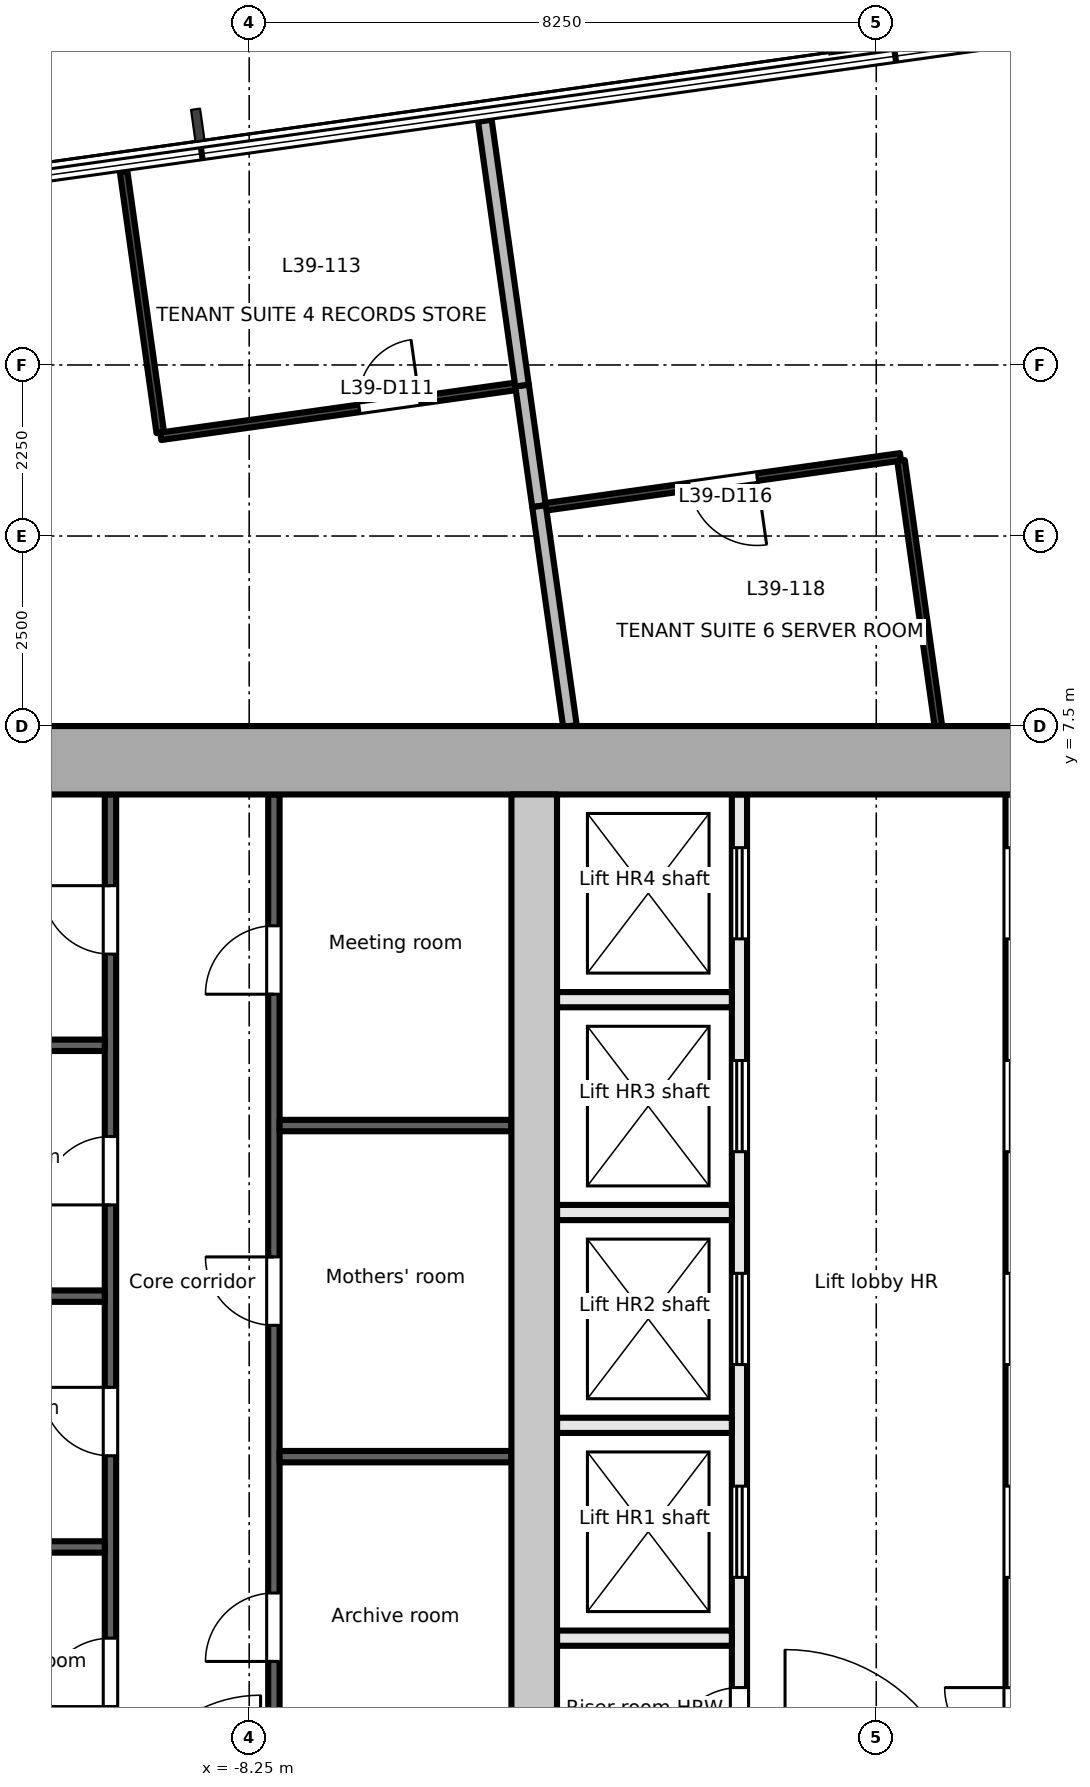
"""IFC4 building model, lengths in metres.
Left out: names, types, materials, properties, quantities, classifications, styles, units other than length and angle.
Written with IfcOpenShell. Run it as: python <this file> out.ifc"""

import sys

from ifc_helpers import new_model, si_unit, direction, frame, frame_2d, origin, origin_2d, place, context, subcontext, project, spatial, rectangle, extrude, element, fill, save


model = new_model("IFC4")
c1 = context("Model", 3, precision=1e-05, world=origin(), true_north=direction((0.0, 1.0)))
c2 = subcontext(c1, "Body", "Model", "MODEL_VIEW")
j1 = project(units=[si_unit("LENGTHUNIT", "METRE"), si_unit("PLANEANGLEUNIT", "RADIAN")], contexts=[c1])
p1 = place(None, origin())
s1 = spatial("IfcSite", under=j1, at=p1, CompositionType="ELEMENT")
p2 = place(p1, origin())
s2 = spatial("IfcBuilding", under=s1, at=p2, CompositionType="ELEMENT")
p3 = place(p2, frame((0.0, 0.0, 172.4)))
s3 = spatial("IfcBuildingStorey", under=s2, at=p3, CompositionType="ELEMENT", Elevation=172.4)
p4 = place(p3, frame((-0.125, 17.34, -0.2), z_axis=(0.0, 0.0, 1.0), x_axis=(0.99027049762, 0.139155817501, 0.0)))
e1 = element("IfcColumn", 1, at=p4, inside=s3, PredefinedType="COLUMN", context=c2, shape_type="SweptSolid", body=[
    extrude(rectangle(XDim=1.2, YDim=1.8, at=origin_2d()), origin(), (0.0, 0.0, 1.0), 3.9),
])
p5 = place(p3, frame((-18.0, 7.05, -0.2), z_axis=(0.0, 0.0, 1.0), x_axis=(1.0, 0.0, 0.0)))
e2 = element("IfcWall", 2, at=p5, inside=s3, PredefinedType="SHEAR", context=c2, shape_type="SweptSolid", body=[
    extrude(rectangle(XDim=36.0, YDim=0.9, at=frame_2d((18.0, 0.0))), origin(), (0.0, 0.0, 1.0), 3.9),
])
p6 = place(p3, frame((-4.5, -6.6, -0.2), z_axis=(0.0, 0.0, 1.0), x_axis=(0.0, 1.0, 0.0)))
e3 = element("IfcWall", 3, at=p6, inside=s3, PredefinedType="SHEAR", context=c2, shape_type="SweptSolid", body=[
    extrude(rectangle(XDim=13.2, YDim=0.6, at=frame_2d((6.6, 0.0))), origin(), (0.0, 0.0, 1.0), 3.9),
])
p7 = place(p3, frame((-10.075, -6.6, 0.0), z_axis=(0.0, 0.0, 1.0), x_axis=(0.0, 1.0, 0.0)))
e4 = element("IfcWall", 4, at=p7, inside=s3, PredefinedType="PARTITIONING", context=c2, shape_type="SweptSolid", body=[
    extrude(rectangle(XDim=13.2, YDim=0.15, at=frame_2d((6.6, 0.0))), origin(), (0.0, 0.0, 1.0), 3.7),
])
p8 = place(p7, frame((1.2, 0.0, 0.0)))
e5 = element("IfcOpeningElement", 5, at=p8, cuts=e4, PredefinedType="OPENING", context=c2, shape_type="SweptSolid", body=[
    extrude(rectangle(XDim=0.9, YDim=2.1, at=frame_2d((0.45, 1.05))), frame((0.0, 0.085, 0.0), z_axis=(0.0, -1.0, 0.0), x_axis=(1.0, 0.0, 0.0)), (0.0, 0.0, 1.0), 0.171),
])
p9 = place(p7, frame((4.5, 0.0, 0.0)))
e6 = element("IfcOpeningElement", 6, at=p9, cuts=e4, PredefinedType="OPENING", context=c2, shape_type="SweptSolid", body=[
    extrude(rectangle(XDim=0.9, YDim=2.1, at=frame_2d((0.45, 1.05))), frame((0.0, 0.085, 0.0), z_axis=(0.0, -1.0, 0.0), x_axis=(1.0, 0.0, 0.0)), (0.0, 0.0, 1.0), 0.171),
])
p10 = place(p7, frame((7.8, 0.0, 0.0)))
e7 = element("IfcOpeningElement", 7, at=p10, cuts=e4, PredefinedType="OPENING", context=c2, shape_type="SweptSolid", body=[
    extrude(rectangle(XDim=0.9, YDim=2.1, at=frame_2d((0.45, 1.05))), frame((0.0, 0.085, 0.0), z_axis=(0.0, -1.0, 0.0), x_axis=(1.0, 0.0, 0.0)), (0.0, 0.0, 1.0), 0.171),
])
p11 = place(p7, frame((11.1, 0.0, 0.0)))
e8 = element("IfcOpeningElement", 8, at=p11, cuts=e4, PredefinedType="OPENING", context=c2, shape_type="SweptSolid", body=[
    extrude(rectangle(XDim=0.9, YDim=2.1, at=frame_2d((0.45, 1.05))), frame((0.0, 0.085, 0.0), z_axis=(0.0, -1.0, 0.0), x_axis=(1.0, 0.0, 0.0)), (0.0, 0.0, 1.0), 0.171),
])
for number, where, z_axis, x_axis in (
    (9, (-13.2, -3.3, 0.0), (0.0, 0.0, 1.0), (1.0, 0.0, 0.0)),
    (10, (-13.2, 0.0, 0.0), (0.0, 0.0, 1.0), (1.0, 0.0, 0.0)),
    (11, (-13.2, 3.3, 0.0), (0.0, 0.0, 1.0), (1.0, 0.0, 0.0)),
):
    element("IfcWall", number, at=place(p3, frame(where, z_axis=z_axis, x_axis=x_axis)), inside=s3, PredefinedType="PARTITIONING", context=c2, shape_type="SweptSolid", body=[
        extrude(rectangle(XDim=3.05, YDim=0.15, at=frame_2d((1.525, 0.0))), origin(), (0.0, 0.0, 1.0), 3.7),
    ])
p12 = place(p3, frame((-7.925, -6.6, 0.0), z_axis=(0.0, 0.0, 1.0), x_axis=(0.0, 1.0, 0.0)))
e12 = element("IfcWall", 12, at=p12, inside=s3, PredefinedType="PARTITIONING", context=c2, shape_type="SweptSolid", body=[
    extrude(rectangle(XDim=13.2, YDim=0.15, at=frame_2d((6.6, 0.0))), origin(), (0.0, 0.0, 1.0), 3.7),
])
p13 = place(p12, frame((1.794, 0.0, 0.0)))
e13 = element("IfcOpeningElement", 13, at=p13, cuts=e12, PredefinedType="OPENING", context=c2, shape_type="SweptSolid", body=[
    extrude(rectangle(XDim=0.9, YDim=2.1, at=frame_2d((0.45, 1.05))), frame((0.0, 0.085, 0.0), z_axis=(0.0, -1.0, 0.0), x_axis=(1.0, 0.0, 0.0)), (0.0, 0.0, 1.0), 0.171),
])
p14 = place(p12, frame((6.216, 0.0, 0.0)))
e14 = element("IfcOpeningElement", 14, at=p14, cuts=e12, PredefinedType="OPENING", context=c2, shape_type="SweptSolid", body=[
    extrude(rectangle(XDim=0.9, YDim=2.1, at=frame_2d((0.45, 1.05))), frame((0.0, 0.085, 0.0), z_axis=(0.0, -1.0, 0.0), x_axis=(1.0, 0.0, 0.0)), (0.0, 0.0, 1.0), 0.171),
])
p15 = place(p12, frame((10.572, 0.0, 0.0)))
e15 = element("IfcOpeningElement", 15, at=p15, cuts=e12, PredefinedType="OPENING", context=c2, shape_type="SweptSolid", body=[
    extrude(rectangle(XDim=0.9, YDim=2.1, at=frame_2d((0.45, 1.05))), frame((0.0, 0.085, 0.0), z_axis=(0.0, -1.0, 0.0), x_axis=(1.0, 0.0, 0.0)), (0.0, 0.0, 1.0), 0.171),
])
for number, where, z_axis, x_axis in (
    (16, (-7.85, -2.112, 0.0), (0.0, 0.0, 1.0), (1.0, 0.0, 0.0)),
    (17, (-7.85, 2.244, 0.0), (0.0, 0.0, 1.0), (1.0, 0.0, 0.0)),
):
    element("IfcWall", number, at=place(p3, frame(where, z_axis=z_axis, x_axis=x_axis)), inside=s3, PredefinedType="PARTITIONING", context=c2, shape_type="SweptSolid", body=[
        extrude(rectangle(XDim=3.05, YDim=0.15, at=frame_2d((1.525, 0.0))), origin(), (0.0, 0.0, 1.0), 3.7),
    ])
p16 = place(p3, frame((-1.8, -6.6, 0.0), z_axis=(0.0, 0.0, 1.0), x_axis=(0.0, 1.0, 0.0)))
e18 = element("IfcWall", 18, at=p16, inside=s3, PredefinedType="PARTITIONING", context=c2, shape_type="SweptSolid", body=[
    extrude(rectangle(XDim=13.2, YDim=0.2, at=frame_2d((6.6, 0.0))), origin(), (0.0, 0.0, 1.0), 3.7),
])
p17 = place(p16, frame((0.55, 0.0, 0.0)))
e19 = element("IfcOpeningElement", 19, at=p17, cuts=e18, PredefinedType="OPENING", context=c2, shape_type="SweptSolid", body=[
    extrude(rectangle(XDim=0.9, YDim=2.1, at=frame_2d((0.45, 1.05))), frame((0.0, 0.111, 0.0), z_axis=(0.0, -1.0, 0.0), x_axis=(1.0, 0.0, 0.0)), (0.0, 0.0, 1.0), 0.221),
])
p18 = place(p16, frame((2.9, 0.0, 0.0)))
e20 = element("IfcOpeningElement", 20, at=p18, cuts=e18, PredefinedType="OPENING", context=c2, shape_type="SweptSolid", body=[
    extrude(rectangle(XDim=1.2, YDim=2.1, at=frame_2d((0.6, 1.05))), frame((0.0, 0.111, 0.0), z_axis=(0.0, -1.0, 0.0), x_axis=(1.0, 0.0, 0.0)), (0.0, 0.0, 1.0), 0.221),
])
p19 = place(p16, frame((5.7, 0.0, 0.0)))
e21 = element("IfcOpeningElement", 21, at=p19, cuts=e18, PredefinedType="OPENING", context=c2, shape_type="SweptSolid", body=[
    extrude(rectangle(XDim=1.2, YDim=2.1, at=frame_2d((0.6, 1.05))), frame((0.0, 0.111, 0.0), z_axis=(0.0, -1.0, 0.0), x_axis=(1.0, 0.0, 0.0)), (0.0, 0.0, 1.0), 0.221),
])
p20 = place(p16, frame((8.5, 0.0, 0.0)))
e22 = element("IfcOpeningElement", 22, at=p20, cuts=e18, PredefinedType="OPENING", context=c2, shape_type="SweptSolid", body=[
    extrude(rectangle(XDim=1.2, YDim=2.1, at=frame_2d((0.6, 1.05))), frame((0.0, 0.111, 0.0), z_axis=(0.0, -1.0, 0.0), x_axis=(1.0, 0.0, 0.0)), (0.0, 0.0, 1.0), 0.221),
])
p21 = place(p16, frame((11.3, 0.0, 0.0)))
e23 = element("IfcOpeningElement", 23, at=p21, cuts=e18, PredefinedType="OPENING", context=c2, shape_type="SweptSolid", body=[
    extrude(rectangle(XDim=1.2, YDim=2.1, at=frame_2d((0.6, 1.05))), frame((0.0, 0.111, 0.0), z_axis=(0.0, -1.0, 0.0), x_axis=(1.0, 0.0, 0.0)), (0.0, 0.0, 1.0), 0.221),
])
p22 = place(p3, frame((1.8, -6.6, 0.0), z_axis=(0.0, 0.0, 1.0), x_axis=(0.0, 1.0, 0.0)))
e24 = element("IfcWall", 24, at=p22, inside=s3, PredefinedType="PARTITIONING", context=c2, shape_type="SweptSolid", body=[
    extrude(rectangle(XDim=13.2, YDim=0.2, at=frame_2d((6.6, 0.0))), origin(), (0.0, 0.0, 1.0), 3.7),
])
p23 = place(p22, frame((0.55, 0.0, 0.0)))
e25 = element("IfcOpeningElement", 25, at=p23, cuts=e24, PredefinedType="OPENING", context=c2, shape_type="SweptSolid", body=[
    extrude(rectangle(XDim=0.9, YDim=2.1, at=frame_2d((0.45, 1.05))), frame((0.0, 0.111, 0.0), z_axis=(0.0, -1.0, 0.0), x_axis=(1.0, 0.0, 0.0)), (0.0, 0.0, 1.0), 0.221),
])
p24 = place(p22, frame((2.9, 0.0, 0.0)))
e26 = element("IfcOpeningElement", 26, at=p24, cuts=e24, PredefinedType="OPENING", context=c2, shape_type="SweptSolid", body=[
    extrude(rectangle(XDim=1.2, YDim=2.1, at=frame_2d((0.6, 1.05))), frame((0.0, 0.111, 0.0), z_axis=(0.0, -1.0, 0.0), x_axis=(1.0, 0.0, 0.0)), (0.0, 0.0, 1.0), 0.221),
])
p25 = place(p22, frame((5.7, 0.0, 0.0)))
e27 = element("IfcOpeningElement", 27, at=p25, cuts=e24, PredefinedType="OPENING", context=c2, shape_type="SweptSolid", body=[
    extrude(rectangle(XDim=1.2, YDim=2.1, at=frame_2d((0.6, 1.05))), frame((0.0, 0.111, 0.0), z_axis=(0.0, -1.0, 0.0), x_axis=(1.0, 0.0, 0.0)), (0.0, 0.0, 1.0), 0.221),
])
p26 = place(p22, frame((8.5, 0.0, 0.0)))
e28 = element("IfcOpeningElement", 28, at=p26, cuts=e24, PredefinedType="OPENING", context=c2, shape_type="SweptSolid", body=[
    extrude(rectangle(XDim=1.2, YDim=2.1, at=frame_2d((0.6, 1.05))), frame((0.0, 0.111, 0.0), z_axis=(0.0, -1.0, 0.0), x_axis=(1.0, 0.0, 0.0)), (0.0, 0.0, 1.0), 0.221),
])
p27 = place(p22, frame((11.3, 0.0, 0.0)))
e29 = element("IfcOpeningElement", 29, at=p27, cuts=e24, PredefinedType="OPENING", context=c2, shape_type="SweptSolid", body=[
    extrude(rectangle(XDim=1.2, YDim=2.1, at=frame_2d((0.6, 1.05))), frame((0.0, 0.111, 0.0), z_axis=(0.0, -1.0, 0.0), x_axis=(1.0, 0.0, 0.0)), (0.0, 0.0, 1.0), 0.221),
])
for number, where, z_axis, x_axis in (
    (30, (-4.2, -1.7, 0.0), (0.0, 0.0, 1.0), (1.0, 0.0, 0.0)),
    (31, (-4.2, 1.1, 0.0), (0.0, 0.0, 1.0), (1.0, 0.0, 0.0)),
    (32, (-4.2, 3.9, 0.0), (0.0, 0.0, 1.0), (1.0, 0.0, 0.0)),
    (33, (-4.2, -4.5, 0.0), (0.0, 0.0, 1.0), (1.0, 0.0, 0.0)),
):
    element("IfcWall", number, at=place(p3, frame(where, z_axis=z_axis, x_axis=x_axis)), inside=s3, PredefinedType="PARTITIONING", context=c2, shape_type="SweptSolid", body=[
        extrude(rectangle(XDim=2.3, YDim=0.2, at=frame_2d((1.15, 0.0))), origin(), (0.0, 0.0, 1.0), 3.7),
    ])
p28 = place(p3, frame((-9.902, 14.794, 0.0), z_axis=(0.0, 0.0, 1.0), x_axis=(0.139094045424, -0.990279176055, 0.0)))
e34 = element("IfcWall", 34, at=p28, inside=s3, PredefinedType="PARTITIONING", context=c2, shape_type="SweptSolid", body=[
    extrude(rectangle(XDim=3.467, YDim=0.1, at=frame_2d((1.733, 0.0))), origin(), (0.0, 0.0, 1.0), 3.7),
])
p29 = place(p3, frame((-9.413, 11.312, 0.0), z_axis=(0.0, 0.0, 1.0), x_axis=(0.99025300455, 0.139280246191, 0.0)))
e35 = element("IfcWall", 35, at=p29, inside=s3, PredefinedType="PARTITIONING", context=c2, shape_type="SweptSolid", body=[
    extrude(rectangle(XDim=4.71, YDim=0.1, at=frame_2d((2.355, 0.0))), origin(), (0.0, 0.0, 1.0), 3.3),
])
p30 = place(p29, frame((2.637, 0.0, 0.0)))
e36 = element("IfcOpeningElement", 36, at=p30, cuts=e35, PredefinedType="OPENING", context=c2, shape_type="SweptSolid", body=[
    extrude(rectangle(XDim=0.8, YDim=2.1, at=frame_2d((0.4, 1.05))), frame((0.0, 0.061, 0.0), z_axis=(0.0, -1.0, 0.0), x_axis=(1.0, 0.0, 0.0)), (0.0, 0.0, 1.0), 0.121),
])
p31 = place(p3, frame((-4.66, 11.98, 0.0), z_axis=(0.0, 0.0, 1.0), x_axis=(0.139096096116, -0.990278888013, 0.0)))
e37 = element("IfcWall", 37, at=p31, inside=s3, PredefinedType="PARTITIONING", context=c2, shape_type="SweptSolid", body=[
    extrude(rectangle(XDim=1.603, YDim=0.18, at=frame_2d((0.801, 0.0))), origin(), (0.0, 0.0, 1.0), 3.25),
])
p32 = place(p3, frame((-4.437, 10.393, 0.0), z_axis=(0.0, 0.0, 1.0), x_axis=(0.139303486007, -0.990249735565, 0.0)))
e38 = element("IfcWall", 38, at=p32, inside=s3, PredefinedType="PARTITIONING", context=c2, shape_type="SweptSolid", body=[
    extrude(rectangle(XDim=2.922, YDim=0.18, at=frame_2d((1.461, 0.0))), origin(), (0.0, 0.0, 1.0), 3.25),
])
p33 = place(p3, frame((-5.149, 15.463, 0.0), z_axis=(0.0, 0.0, 1.0), x_axis=(0.139039982937, -0.990286768136, 0.0)))
e39 = element("IfcWall", 39, at=p33, inside=s3, PredefinedType="PARTITIONING", context=c2, shape_type="SweptSolid", body=[
    extrude(rectangle(XDim=3.517, YDim=0.18, at=frame_2d((1.759, 0.0))), origin(), (0.0, 0.0, 1.0), 3.25),
])
p34 = place(p3, frame((0.319, 11.041, 0.0), z_axis=(0.0, 0.0, 1.0), x_axis=(-0.99025300455, -0.139280246191, 0.0)))
e40 = element("IfcWall", 40, at=p34, inside=s3, PredefinedType="PARTITIONING", context=c2, shape_type="SweptSolid", body=[
    extrude(rectangle(XDim=4.71, YDim=0.1, at=frame_2d((2.355, 0.0))), origin(), (0.0, 0.0, 1.0), 3.25),
])
p35 = place(p34, frame((1.905, 0.0, 0.0)))
e41 = element("IfcOpeningElement", 41, at=p35, cuts=e40, PredefinedType="OPENING", context=c2, shape_type="SweptSolid", body=[
    extrude(rectangle(XDim=0.9, YDim=2.1, at=frame_2d((0.45, 1.05))), frame((0.0, 0.061, 0.0), z_axis=(0.0, -1.0, 0.0), x_axis=(1.0, 0.0, 0.0)), (0.0, 0.0, 1.0), 0.121),
])
p36 = place(p3, frame((0.817, 7.5, 0.0), z_axis=(0.0, 0.0, 1.0), x_axis=(-0.139230432727, 0.990260009595, 0.0)))
e42 = element("IfcWall", 42, at=p36, inside=s3, PredefinedType="PARTITIONING", context=c2, shape_type="SweptSolid", body=[
    extrude(rectangle(XDim=3.526, YDim=0.1, at=frame_2d((1.763, 0.0))), origin(), (0.0, 0.0, 1.0), 3.7),
])
p37 = place(p8, origin())
e43 = element("IfcDoor", 43, at=p37, inside=s3, OperationType="SINGLE_SWING_LEFT", PredefinedType="DOOR", context=c2, shape_type="SweptSolid", body=[
    extrude(rectangle(XDim=0.9, YDim=2.1, at=frame_2d((0.45, 1.05))), frame((0.0, 0.025, 0.0), z_axis=(0.0, -1.0, 0.0), x_axis=(1.0, 0.0, 0.0)), (0.0, 0.0, 1.0), 0.05),
])
fill(e5, e43)
p38 = place(p9, origin())
e44 = element("IfcDoor", 44, at=p38, inside=s3, OperationType="SINGLE_SWING_RIGHT", PredefinedType="DOOR", context=c2, shape_type="SweptSolid", body=[
    extrude(rectangle(XDim=0.9, YDim=2.1, at=frame_2d((0.45, 1.05))), frame((0.0, 0.025, 0.0), z_axis=(0.0, -1.0, 0.0), x_axis=(1.0, 0.0, 0.0)), (0.0, 0.0, 1.0), 0.05),
])
fill(e6, e44)
p39 = place(p10, origin())
e45 = element("IfcDoor", 45, at=p39, inside=s3, OperationType="SINGLE_SWING_LEFT", PredefinedType="DOOR", context=c2, shape_type="SweptSolid", body=[
    extrude(rectangle(XDim=0.9, YDim=2.1, at=frame_2d((0.45, 1.05))), frame((0.0, 0.025, 0.0), z_axis=(0.0, -1.0, 0.0), x_axis=(1.0, 0.0, 0.0)), (0.0, 0.0, 1.0), 0.05),
])
fill(e7, e45)
p40 = place(p11, origin())
e46 = element("IfcDoor", 46, at=p40, inside=s3, OperationType="SINGLE_SWING_RIGHT", PredefinedType="DOOR", context=c2, shape_type="SweptSolid", body=[
    extrude(rectangle(XDim=0.9, YDim=2.1, at=frame_2d((0.45, 1.05))), frame((0.0, 0.025, 0.0), z_axis=(0.0, -1.0, 0.0), x_axis=(1.0, 0.0, 0.0)), (0.0, 0.0, 1.0), 0.05),
])
fill(e8, e46)
p41 = place(p13, origin())
e47 = element("IfcDoor", 47, at=p41, inside=s3, OperationType="SINGLE_SWING_LEFT", PredefinedType="DOOR", context=c2, shape_type="SweptSolid", body=[
    extrude(rectangle(XDim=0.9, YDim=2.1, at=frame_2d((0.45, 1.05))), frame((0.0, 0.025, 0.0), z_axis=(0.0, -1.0, 0.0), x_axis=(1.0, 0.0, 0.0)), (0.0, 0.0, 1.0), 0.05),
])
fill(e13, e47)
p42 = place(p14, origin())
e48 = element("IfcDoor", 48, at=p42, inside=s3, OperationType="SINGLE_SWING_RIGHT", PredefinedType="DOOR", context=c2, shape_type="SweptSolid", body=[
    extrude(rectangle(XDim=0.9, YDim=2.1, at=frame_2d((0.45, 1.05))), frame((0.0, 0.025, 0.0), z_axis=(0.0, -1.0, 0.0), x_axis=(1.0, 0.0, 0.0)), (0.0, 0.0, 1.0), 0.05),
])
fill(e14, e48)
p43 = place(p15, origin())
e49 = element("IfcDoor", 49, at=p43, inside=s3, OperationType="SINGLE_SWING_LEFT", PredefinedType="DOOR", context=c2, shape_type="SweptSolid", body=[
    extrude(rectangle(XDim=0.9, YDim=2.1, at=frame_2d((0.45, 1.05))), frame((0.0, 0.025, 0.0), z_axis=(0.0, -1.0, 0.0), x_axis=(1.0, 0.0, 0.0)), (0.0, 0.0, 1.0), 0.05),
])
fill(e15, e49)
p44 = place(p17, origin())
e50 = element("IfcDoor", 50, at=p44, inside=s3, OperationType="SINGLE_SWING_LEFT", PredefinedType="DOOR", context=c2, shape_type="SweptSolid", body=[
    extrude(rectangle(XDim=0.9, YDim=2.1, at=frame_2d((0.45, 1.05))), frame((0.0, 0.025, 0.0), z_axis=(0.0, -1.0, 0.0), x_axis=(1.0, 0.0, 0.0)), (0.0, 0.0, 1.0), 0.05),
])
fill(e19, e50)
p45 = place(p18, origin())
e51 = element("IfcDoor", 51, at=p45, inside=s3, OperationType="DOUBLE_DOOR_SLIDING", PredefinedType="DOOR", context=c2, shape_type="SweptSolid", body=[
    extrude(rectangle(XDim=1.2, YDim=2.1, at=frame_2d((0.6, 1.05))), frame((0.0, 0.025, 0.0), z_axis=(0.0, -1.0, 0.0), x_axis=(1.0, 0.0, 0.0)), (0.0, 0.0, 1.0), 0.05),
])
fill(e20, e51)
p46 = place(p19, origin())
e52 = element("IfcDoor", 52, at=p46, inside=s3, OperationType="DOUBLE_DOOR_SLIDING", PredefinedType="DOOR", context=c2, shape_type="SweptSolid", body=[
    extrude(rectangle(XDim=1.2, YDim=2.1, at=frame_2d((0.6, 1.05))), frame((0.0, 0.025, 0.0), z_axis=(0.0, -1.0, 0.0), x_axis=(1.0, 0.0, 0.0)), (0.0, 0.0, 1.0), 0.05),
])
fill(e21, e52)
p47 = place(p20, origin())
e53 = element("IfcDoor", 53, at=p47, inside=s3, OperationType="DOUBLE_DOOR_SLIDING", PredefinedType="DOOR", context=c2, shape_type="SweptSolid", body=[
    extrude(rectangle(XDim=1.2, YDim=2.1, at=frame_2d((0.6, 1.05))), frame((0.0, 0.025, 0.0), z_axis=(0.0, -1.0, 0.0), x_axis=(1.0, 0.0, 0.0)), (0.0, 0.0, 1.0), 0.05),
])
fill(e22, e53)
p48 = place(p21, origin())
e54 = element("IfcDoor", 54, at=p48, inside=s3, OperationType="DOUBLE_DOOR_SLIDING", PredefinedType="DOOR", context=c2, shape_type="SweptSolid", body=[
    extrude(rectangle(XDim=1.2, YDim=2.1, at=frame_2d((0.6, 1.05))), frame((0.0, 0.025, 0.0), z_axis=(0.0, -1.0, 0.0), x_axis=(1.0, 0.0, 0.0)), (0.0, 0.0, 1.0), 0.05),
])
fill(e23, e54)
p49 = place(p30, origin())
e55 = element("IfcDoor", 55, at=p49, inside=s3, OperationType="SINGLE_SWING_RIGHT", PredefinedType="DOOR", context=c2, shape_type="SweptSolid", body=[
    extrude(rectangle(XDim=0.8, YDim=2.1, at=frame_2d((0.4, 1.05))), frame((0.0, 0.025, 0.0), z_axis=(0.0, -1.0, 0.0), x_axis=(1.0, 0.0, 0.0)), (0.0, 0.0, 1.0), 0.05),
])
fill(e36, e55)
p50 = place(p35, origin())
e56 = element("IfcDoor", 56, at=p50, inside=s3, OperationType="SINGLE_SWING_LEFT", PredefinedType="DOOR", context=c2, shape_type="SweptSolid", body=[
    extrude(rectangle(XDim=0.9, YDim=2.1, at=frame_2d((0.45, 1.05))), frame((0.0, 0.025, 0.0), z_axis=(0.0, -1.0, 0.0), x_axis=(1.0, 0.0, 0.0)), (0.0, 0.0, 1.0), 0.05),
])
fill(e41, e56)
save(model, sys.argv[1])
